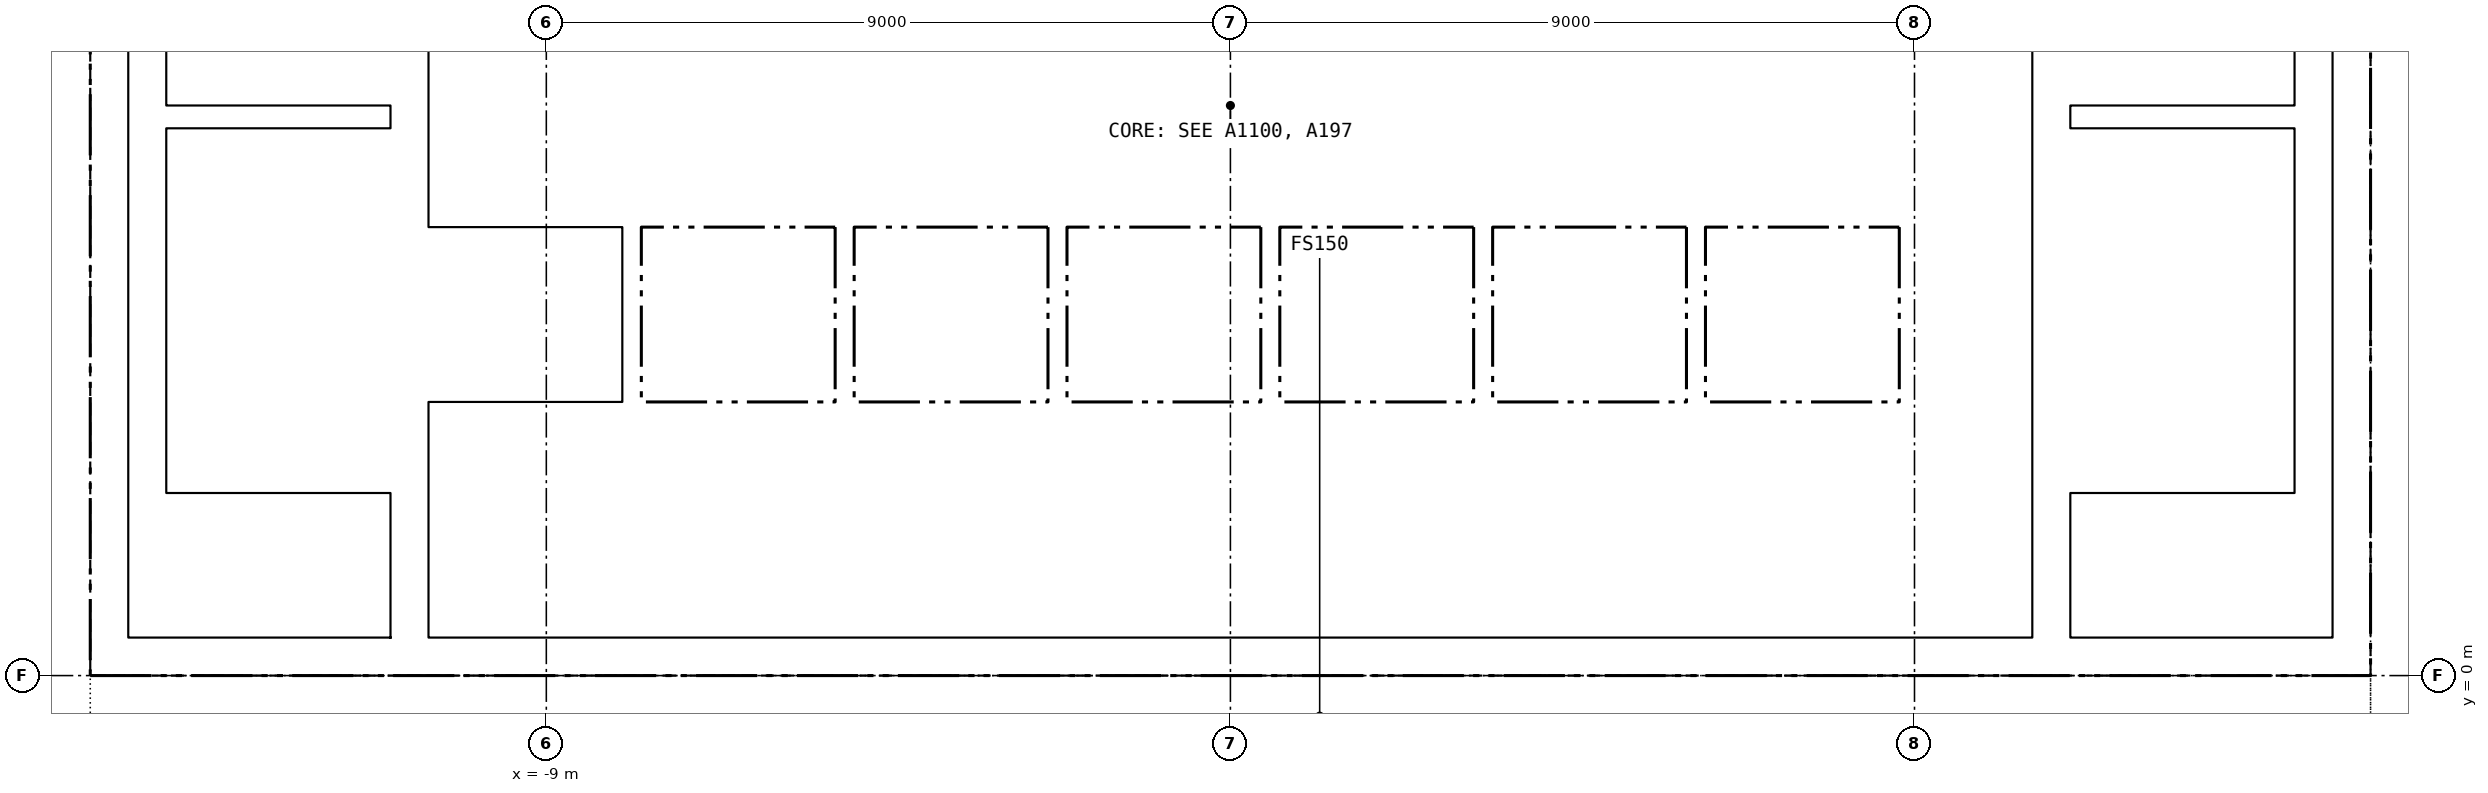
"""IFC4 building model, lengths in metres.
Left out: names, types, materials, properties, quantities, classifications, styles, units other than length and angle.
Written with IfcOpenShell. Run it as: python <this file> out.ifc"""

import sys

from ifc_helpers import new_model, si_unit, direction, frame, frame_2d, origin, place, context, subcontext, project, spatial, rectangle, extrude, element, fill, save


model = new_model("IFC4")
c1 = context("Model", 3, precision=1e-05, world=origin(), true_north=direction((0.0, 1.0)))
c2 = subcontext(c1, "Body", "Model", "MODEL_VIEW")
j1 = project(units=[si_unit("LENGTHUNIT", "METRE"), si_unit("PLANEANGLEUNIT", "RADIAN")], contexts=[c1])
p1 = place(None, origin())
s1 = spatial("IfcSite", under=j1, at=p1, CompositionType="ELEMENT")
p2 = place(p1, origin())
s2 = spatial("IfcBuilding", under=s1, at=p2, CompositionType="ELEMENT")
p3 = place(p2, frame((0.0, 0.0, 293.8)))
s3 = spatial("IfcBuildingStorey", under=s2, at=p3, CompositionType="ELEMENT", Elevation=293.8)
p4 = place(p3, frame((-15.0, 0.25, -0.15), z_axis=(0.0, 0.0, 1.0), x_axis=(1.0, 0.0, 0.0)))
e1 = element("IfcWall", 1, at=p4, inside=s3, PredefinedType="SOLIDWALL", context=c2, shape_type="SweptSolid", body=[
    extrude(rectangle(XDim=30.0, YDim=0.5, at=frame_2d((15.0, 0.0))), origin(), (0.0, 0.0, 1.0), 3.65),
])
p5 = place(p4, frame((5.8, 0.0, 0.15)))
e2 = element("IfcOpeningElement", 2, at=p5, cuts=e1, PredefinedType="OPENING", context=c2, shape_type="SweptSolid", body=[
    extrude(rectangle(XDim=2.4, YDim=2.4, at=frame_2d((1.2, 1.2))), frame((0.0, 0.26, 0.0), z_axis=(0.0, -1.0, 0.0), x_axis=(1.0, 0.0, 0.0)), (0.0, 0.0, 1.0), 0.52),
])
p6 = place(p4, frame((13.8, 0.0, 0.15)))
e3 = element("IfcOpeningElement", 3, at=p6, cuts=e1, PredefinedType="OPENING", context=c2, shape_type="SweptSolid", body=[
    extrude(rectangle(XDim=2.4, YDim=2.4, at=frame_2d((1.2, 1.2))), frame((0.0, 0.26, 0.0), z_axis=(0.0, -1.0, 0.0), x_axis=(1.0, 0.0, 0.0)), (0.0, 0.0, 1.0), 0.52),
])
p7 = place(p4, frame((21.8, 0.0, 0.15)))
e4 = element("IfcOpeningElement", 4, at=p7, cuts=e1, PredefinedType="OPENING", context=c2, shape_type="SweptSolid", body=[
    extrude(rectangle(XDim=2.4, YDim=2.4, at=frame_2d((1.2, 1.2))), frame((0.0, 0.26, 0.0), z_axis=(0.0, -1.0, 0.0), x_axis=(1.0, 0.0, 0.0)), (0.0, 0.0, 1.0), 0.52),
])
p8 = place(p4, frame((1.5, 0.0, 0.15)))
e5 = element("IfcOpeningElement", 5, at=p8, cuts=e1, PredefinedType="OPENING", context=c2, shape_type="SweptSolid", body=[
    extrude(rectangle(XDim=1.2, YDim=2.1, at=frame_2d((0.6, 1.05))), frame((0.0, 0.26, 0.0), z_axis=(0.0, -1.0, 0.0), x_axis=(1.0, 0.0, 0.0)), (0.0, 0.0, 1.0), 0.52),
])
p9 = place(p4, frame((27.3, 0.0, 0.15)))
e6 = element("IfcOpeningElement", 6, at=p9, cuts=e1, PredefinedType="OPENING", context=c2, shape_type="SweptSolid", body=[
    extrude(rectangle(XDim=1.2, YDim=2.1, at=frame_2d((0.6, 1.05))), frame((0.0, 0.26, 0.0), z_axis=(0.0, -1.0, 0.0), x_axis=(1.0, 0.0, 0.0)), (0.0, 0.0, 1.0), 0.52),
])
for number, where, z_axis, x_axis in (
    (7, (-14.75, 0.5, -0.15), (0.0, 0.0, 1.0), (0.0, 1.0, 0.0)),
    (8, (14.75, 0.5, -0.15), (0.0, 0.0, 1.0), (0.0, 1.0, 0.0)),
    (9, (-10.8, 0.5, -0.15), (0.0, 0.0, 1.0), (0.0, 1.0, 0.0)),
    (10, (10.8, 0.5, -0.15), (0.0, 0.0, 1.0), (0.0, 1.0, 0.0)),
):
    element("IfcWall", number, at=place(p3, frame(where, z_axis=z_axis, x_axis=x_axis)), inside=s3, PredefinedType="SOLIDWALL", context=c2, shape_type="SweptSolid", body=[
        extrude(rectangle(XDim=14.0, YDim=0.5, at=frame_2d((7.0, 0.0))), origin(), (0.0, 0.0, 1.0), 3.65),
    ])
p10 = place(p3, frame((-10.55, 3.5, 0.0), z_axis=(0.0, 0.0, 1.0), x_axis=(1.0, 0.0, 0.0)))
e11 = element("IfcWall", 11, at=p10, inside=s3, PredefinedType="PARTITIONING", context=c2, shape_type="SweptSolid", body=[
    extrude(rectangle(XDim=21.1, YDim=0.2, at=frame_2d((10.55, 0.0))), origin(), (0.0, 0.0, 1.0), 3.5),
])
p11 = place(p10, frame((0.675, 0.0, 0.0)))
e12 = element("IfcOpeningElement", 12, at=p11, cuts=e11, PredefinedType="OPENING", context=c2, shape_type="SweptSolid", body=[
    extrude(rectangle(XDim=1.2, YDim=2.1, at=frame_2d((0.6, 1.05))), frame((0.0, 0.11, 0.0), z_axis=(0.0, -1.0, 0.0), x_axis=(1.0, 0.0, 0.0)), (0.0, 0.0, 1.0), 0.22),
])
p12 = place(p10, frame((3.475, 0.0, 0.0)))
e13 = element("IfcOpeningElement", 13, at=p12, cuts=e11, PredefinedType="OPENING", context=c2, shape_type="SweptSolid", body=[
    extrude(rectangle(XDim=1.2, YDim=2.1, at=frame_2d((0.6, 1.05))), frame((0.0, 0.11, 0.0), z_axis=(0.0, -1.0, 0.0), x_axis=(1.0, 0.0, 0.0)), (0.0, 0.0, 1.0), 0.22),
])
p13 = place(p10, frame((6.275, 0.0, 0.0)))
e14 = element("IfcOpeningElement", 14, at=p13, cuts=e11, PredefinedType="OPENING", context=c2, shape_type="SweptSolid", body=[
    extrude(rectangle(XDim=1.2, YDim=2.1, at=frame_2d((0.6, 1.05))), frame((0.0, 0.11, 0.0), z_axis=(0.0, -1.0, 0.0), x_axis=(1.0, 0.0, 0.0)), (0.0, 0.0, 1.0), 0.22),
])
p14 = place(p10, frame((9.075, 0.0, 0.0)))
e15 = element("IfcOpeningElement", 15, at=p14, cuts=e11, PredefinedType="OPENING", context=c2, shape_type="SweptSolid", body=[
    extrude(rectangle(XDim=1.2, YDim=2.1, at=frame_2d((0.6, 1.05))), frame((0.0, 0.11, 0.0), z_axis=(0.0, -1.0, 0.0), x_axis=(1.0, 0.0, 0.0)), (0.0, 0.0, 1.0), 0.22),
])
p15 = place(p10, frame((11.875, 0.0, 0.0)))
e16 = element("IfcOpeningElement", 16, at=p15, cuts=e11, PredefinedType="OPENING", context=c2, shape_type="SweptSolid", body=[
    extrude(rectangle(XDim=1.2, YDim=2.1, at=frame_2d((0.6, 1.05))), frame((0.0, 0.11, 0.0), z_axis=(0.0, -1.0, 0.0), x_axis=(1.0, 0.0, 0.0)), (0.0, 0.0, 1.0), 0.22),
])
p16 = place(p10, frame((14.675, 0.0, 0.0)))
e17 = element("IfcOpeningElement", 17, at=p16, cuts=e11, PredefinedType="OPENING", context=c2, shape_type="SweptSolid", body=[
    extrude(rectangle(XDim=1.2, YDim=2.1, at=frame_2d((0.6, 1.05))), frame((0.0, 0.11, 0.0), z_axis=(0.0, -1.0, 0.0), x_axis=(1.0, 0.0, 0.0)), (0.0, 0.0, 1.0), 0.22),
])
p17 = place(p10, frame((17.475, 0.0, 0.0)))
e18 = element("IfcOpeningElement", 18, at=p17, cuts=e11, PredefinedType="OPENING", context=c2, shape_type="SweptSolid", body=[
    extrude(rectangle(XDim=1.2, YDim=2.1, at=frame_2d((0.6, 1.05))), frame((0.0, 0.11, 0.0), z_axis=(0.0, -1.0, 0.0), x_axis=(1.0, 0.0, 0.0)), (0.0, 0.0, 1.0), 0.22),
])
p18 = place(p10, frame((19.9, 0.0, 0.0)))
e19 = element("IfcOpeningElement", 19, at=p18, cuts=e11, PredefinedType="OPENING", context=c2, shape_type="SweptSolid", body=[
    extrude(rectangle(XDim=0.9, YDim=2.1, at=frame_2d((0.45, 1.05))), frame((0.0, 0.11, 0.0), z_axis=(0.0, -1.0, 0.0), x_axis=(1.0, 0.0, 0.0)), (0.0, 0.0, 1.0), 0.22),
])
p19 = place(p3, frame((-10.55, 6.025, 0.0), z_axis=(0.0, 0.0, 1.0), x_axis=(1.0, 0.0, 0.0)))
e20 = element("IfcWall", 20, at=p19, inside=s3, PredefinedType="PARTITIONING", context=c2, shape_type="SweptSolid", body=[
    extrude(rectangle(XDim=21.1, YDim=0.25, at=frame_2d((10.55, 0.0))), origin(), (0.0, 0.0, 1.0), 3.5),
])
p20 = place(p3, frame((-4.125, 6.15, 0.0), z_axis=(0.0, 0.0, 1.0), x_axis=(0.0, 1.0, 0.0)))
e21 = element("IfcWall", 21, at=p20, inside=s3, PredefinedType="PARTITIONING", context=c2, shape_type="SweptSolid", body=[
    extrude(rectangle(XDim=4.95, YDim=0.25, at=frame_2d((2.475, 0.0))), origin(), (0.0, 0.0, 1.0), 3.5),
])
p21 = place(p20, frame((3.125, 0.0, 0.0)))
e22 = element("IfcOpeningElement", 22, at=p21, cuts=e21, PredefinedType="OPENING", context=c2, shape_type="SweptSolid", body=[
    extrude(rectangle(XDim=1.2, YDim=2.1, at=frame_2d((0.6, 1.05))), frame((0.0, 0.135, 0.0), z_axis=(0.0, -1.0, 0.0), x_axis=(1.0, 0.0, 0.0)), (0.0, 0.0, 1.0), 0.27),
])
for number, where, z_axis, x_axis in (
    (23, (-7.875, 3.6, 0.0), (0.0, 0.0, 1.0), (0.0, 1.0, 0.0)),
    (24, (-5.075, 3.6, 0.0), (0.0, 0.0, 1.0), (0.0, 1.0, 0.0)),
    (25, (-2.275, 3.6, 0.0), (0.0, 0.0, 1.0), (0.0, 1.0, 0.0)),
    (26, (0.525, 3.6, 0.0), (0.0, 0.0, 1.0), (0.0, 1.0, 0.0)),
    (27, (3.325, 3.6, 0.0), (0.0, 0.0, 1.0), (0.0, 1.0, 0.0)),
    (28, (6.125, 3.6, 0.0), (0.0, 0.0, 1.0), (0.0, 1.0, 0.0)),
    (29, (8.925, 3.6, 0.0), (0.0, 0.0, 1.0), (0.0, 1.0, 0.0)),
):
    element("IfcWall", number, at=place(p3, frame(where, z_axis=z_axis, x_axis=x_axis)), inside=s3, PredefinedType="PARTITIONING", context=c2, shape_type="SweptSolid", body=[
        extrude(rectangle(XDim=2.3, YDim=0.25, at=frame_2d((1.15, 0.0))), origin(), (0.0, 0.0, 1.0), 3.5),
    ])
for number, where, z_axis, x_axis in (
    (30, (1.7, 6.15, 0.0), (0.0, 0.0, 1.0), (0.0, 1.0, 0.0)),
    (31, (4.6, 6.15, 0.0), (0.0, 0.0, 1.0), (0.0, 1.0, 0.0)),
):
    element("IfcWall", number, at=place(p3, frame(where, z_axis=z_axis, x_axis=x_axis)), inside=s3, PredefinedType="PARTITIONING", context=c2, shape_type="SweptSolid", body=[
        extrude(rectangle(XDim=2.3, YDim=0.15, at=frame_2d((1.15, 0.0))), origin(), (0.0, 0.0, 1.0), 3.5),
    ])
p22 = place(p3, frame((8.925, 6.15, 0.0), z_axis=(0.0, 0.0, 1.0), x_axis=(0.0, 1.0, 0.0)))
e32 = element("IfcWall", 32, at=p22, inside=s3, PredefinedType="PARTITIONING", context=c2, shape_type="SweptSolid", body=[
    extrude(rectangle(XDim=2.3, YDim=0.25, at=frame_2d((1.15, 0.0))), origin(), (0.0, 0.0, 1.0), 3.5),
])
p23 = place(p3, frame((-14.0, 7.35, 0.0), z_axis=(0.0, 0.0, 1.0), x_axis=(1.0, 0.0, 0.0)))
e33 = element("IfcWall", 33, at=p23, inside=s3, PredefinedType="SOLIDWALL", context=c2, shape_type="SweptSolid", body=[
    extrude(rectangle(XDim=2.95, YDim=0.3, at=frame_2d((1.475, 0.0))), origin(), (0.0, 0.0, 1.0), 3.5),
])
p24 = place(p3, frame((-14.25, 0.5, 0.0), z_axis=(0.0, 0.0, 1.0), x_axis=(0.0, 1.0, 0.0)))
e34 = element("IfcWall", 34, at=p24, inside=s3, PredefinedType="SOLIDWALL", context=c2, shape_type="SweptSolid", body=[
    extrude(rectangle(XDim=14.0, YDim=0.5, at=frame_2d((7.0, 0.0))), origin(), (0.0, 0.0, 1.0), 3.5),
])
p25 = place(p3, frame((11.05, 7.35, 0.0), z_axis=(0.0, 0.0, 1.0), x_axis=(1.0, 0.0, 0.0)))
e35 = element("IfcWall", 35, at=p25, inside=s3, PredefinedType="SOLIDWALL", context=c2, shape_type="SweptSolid", body=[
    extrude(rectangle(XDim=2.95, YDim=0.3, at=frame_2d((1.475, 0.0))), origin(), (0.0, 0.0, 1.0), 3.5),
])
p26 = place(p3, frame((14.25, 0.5, 0.0), z_axis=(0.0, 0.0, 1.0), x_axis=(0.0, 1.0, 0.0)))
e36 = element("IfcWall", 36, at=p26, inside=s3, PredefinedType="SOLIDWALL", context=c2, shape_type="SweptSolid", body=[
    extrude(rectangle(XDim=14.0, YDim=0.5, at=frame_2d((7.0, 0.0))), origin(), (0.0, 0.0, 1.0), 3.5),
])
p27 = place(p11, origin())
e37 = element("IfcDoor", 37, at=p27, inside=s3, OperationType="DOUBLE_DOOR_SLIDING", PredefinedType="DOOR", context=c2, shape_type="SweptSolid", body=[
    extrude(rectangle(XDim=1.2, YDim=2.1, at=frame_2d((0.6, 1.05))), frame((0.0, 0.025, 0.0), z_axis=(0.0, -1.0, 0.0), x_axis=(1.0, 0.0, 0.0)), (0.0, 0.0, 1.0), 0.05),
])
fill(e12, e37)
p28 = place(p12, origin())
e38 = element("IfcDoor", 38, at=p28, inside=s3, OperationType="DOUBLE_DOOR_SLIDING", PredefinedType="DOOR", context=c2, shape_type="SweptSolid", body=[
    extrude(rectangle(XDim=1.2, YDim=2.1, at=frame_2d((0.6, 1.05))), frame((0.0, 0.025, 0.0), z_axis=(0.0, -1.0, 0.0), x_axis=(1.0, 0.0, 0.0)), (0.0, 0.0, 1.0), 0.05),
])
fill(e13, e38)
p29 = place(p13, origin())
e39 = element("IfcDoor", 39, at=p29, inside=s3, OperationType="DOUBLE_DOOR_SLIDING", PredefinedType="DOOR", context=c2, shape_type="SweptSolid", body=[
    extrude(rectangle(XDim=1.2, YDim=2.1, at=frame_2d((0.6, 1.05))), frame((0.0, 0.025, 0.0), z_axis=(0.0, -1.0, 0.0), x_axis=(1.0, 0.0, 0.0)), (0.0, 0.0, 1.0), 0.05),
])
fill(e14, e39)
p30 = place(p14, origin())
e40 = element("IfcDoor", 40, at=p30, inside=s3, OperationType="DOUBLE_DOOR_SLIDING", PredefinedType="DOOR", context=c2, shape_type="SweptSolid", body=[
    extrude(rectangle(XDim=1.2, YDim=2.1, at=frame_2d((0.6, 1.05))), frame((0.0, 0.025, 0.0), z_axis=(0.0, -1.0, 0.0), x_axis=(1.0, 0.0, 0.0)), (0.0, 0.0, 1.0), 0.05),
])
fill(e15, e40)
p31 = place(p15, origin())
e41 = element("IfcDoor", 41, at=p31, inside=s3, OperationType="DOUBLE_DOOR_SLIDING", PredefinedType="DOOR", context=c2, shape_type="SweptSolid", body=[
    extrude(rectangle(XDim=1.2, YDim=2.1, at=frame_2d((0.6, 1.05))), frame((0.0, 0.025, 0.0), z_axis=(0.0, -1.0, 0.0), x_axis=(1.0, 0.0, 0.0)), (0.0, 0.0, 1.0), 0.05),
])
fill(e16, e41)
p32 = place(p16, origin())
e42 = element("IfcDoor", 42, at=p32, inside=s3, OperationType="DOUBLE_DOOR_SLIDING", PredefinedType="DOOR", context=c2, shape_type="SweptSolid", body=[
    extrude(rectangle(XDim=1.2, YDim=2.1, at=frame_2d((0.6, 1.05))), frame((0.0, 0.025, 0.0), z_axis=(0.0, -1.0, 0.0), x_axis=(1.0, 0.0, 0.0)), (0.0, 0.0, 1.0), 0.05),
])
fill(e17, e42)
p33 = place(p17, origin())
e43 = element("IfcDoor", 43, at=p33, inside=s3, OperationType="DOUBLE_DOOR_SLIDING", PredefinedType="DOOR", context=c2, shape_type="SweptSolid", body=[
    extrude(rectangle(XDim=1.2, YDim=2.1, at=frame_2d((0.6, 1.05))), frame((0.0, 0.025, 0.0), z_axis=(0.0, -1.0, 0.0), x_axis=(1.0, 0.0, 0.0)), (0.0, 0.0, 1.0), 0.05),
])
fill(e18, e43)
p34 = place(p18, origin())
e44 = element("IfcDoor", 44, at=p34, inside=s3, OperationType="SINGLE_SWING_RIGHT", PredefinedType="DOOR", context=c2, shape_type="SweptSolid", body=[
    extrude(rectangle(XDim=0.9, YDim=2.1, at=frame_2d((0.45, 1.05))), frame((0.0, 0.025, 0.0), z_axis=(0.0, -1.0, 0.0), x_axis=(1.0, 0.0, 0.0)), (0.0, 0.0, 1.0), 0.05),
])
fill(e19, e44)
p35 = place(p5, origin())
e45 = element("IfcDoor", 45, at=p35, inside=s3, OperationType="DOUBLE_DOOR_DOUBLE_SWING", PredefinedType="DOOR", context=c2, shape_type="SweptSolid", body=[
    extrude(rectangle(XDim=2.4, YDim=2.4, at=frame_2d((1.2, 1.2))), frame((0.0, 0.025, 0.0), z_axis=(0.0, -1.0, 0.0), x_axis=(1.0, 0.0, 0.0)), (0.0, 0.0, 1.0), 0.05),
])
fill(e2, e45)
p36 = place(p6, origin())
e46 = element("IfcDoor", 46, at=p36, inside=s3, OperationType="DOUBLE_DOOR_DOUBLE_SWING", PredefinedType="DOOR", context=c2, shape_type="SweptSolid", body=[
    extrude(rectangle(XDim=2.4, YDim=2.4, at=frame_2d((1.2, 1.2))), frame((0.0, 0.025, 0.0), z_axis=(0.0, -1.0, 0.0), x_axis=(1.0, 0.0, 0.0)), (0.0, 0.0, 1.0), 0.05),
])
fill(e3, e46)
p37 = place(p7, origin())
e47 = element("IfcDoor", 47, at=p37, inside=s3, OperationType="DOUBLE_DOOR_DOUBLE_SWING", PredefinedType="DOOR", context=c2, shape_type="SweptSolid", body=[
    extrude(rectangle(XDim=2.4, YDim=2.4, at=frame_2d((1.2, 1.2))), frame((0.0, 0.025, 0.0), z_axis=(0.0, -1.0, 0.0), x_axis=(1.0, 0.0, 0.0)), (0.0, 0.0, 1.0), 0.05),
])
fill(e4, e47)
p38 = place(p8, origin())
e48 = element("IfcDoor", 48, at=p38, inside=s3, OperationType="SINGLE_SWING_LEFT", PredefinedType="DOOR", context=c2, shape_type="SweptSolid", body=[
    extrude(rectangle(XDim=1.2, YDim=2.1, at=frame_2d((0.6, 1.05))), frame((0.0, 0.025, 0.0), z_axis=(0.0, -1.0, 0.0), x_axis=(1.0, 0.0, 0.0)), (0.0, 0.0, 1.0), 0.05),
])
fill(e5, e48)
p39 = place(p9, origin())
e49 = element("IfcDoor", 49, at=p39, inside=s3, OperationType="SINGLE_SWING_RIGHT", PredefinedType="DOOR", context=c2, shape_type="SweptSolid", body=[
    extrude(rectangle(XDim=1.2, YDim=2.1, at=frame_2d((0.6, 1.05))), frame((0.0, 0.025, 0.0), z_axis=(0.0, -1.0, 0.0), x_axis=(1.0, 0.0, 0.0)), (0.0, 0.0, 1.0), 0.05),
])
fill(e6, e49)
save(model, sys.argv[1])
